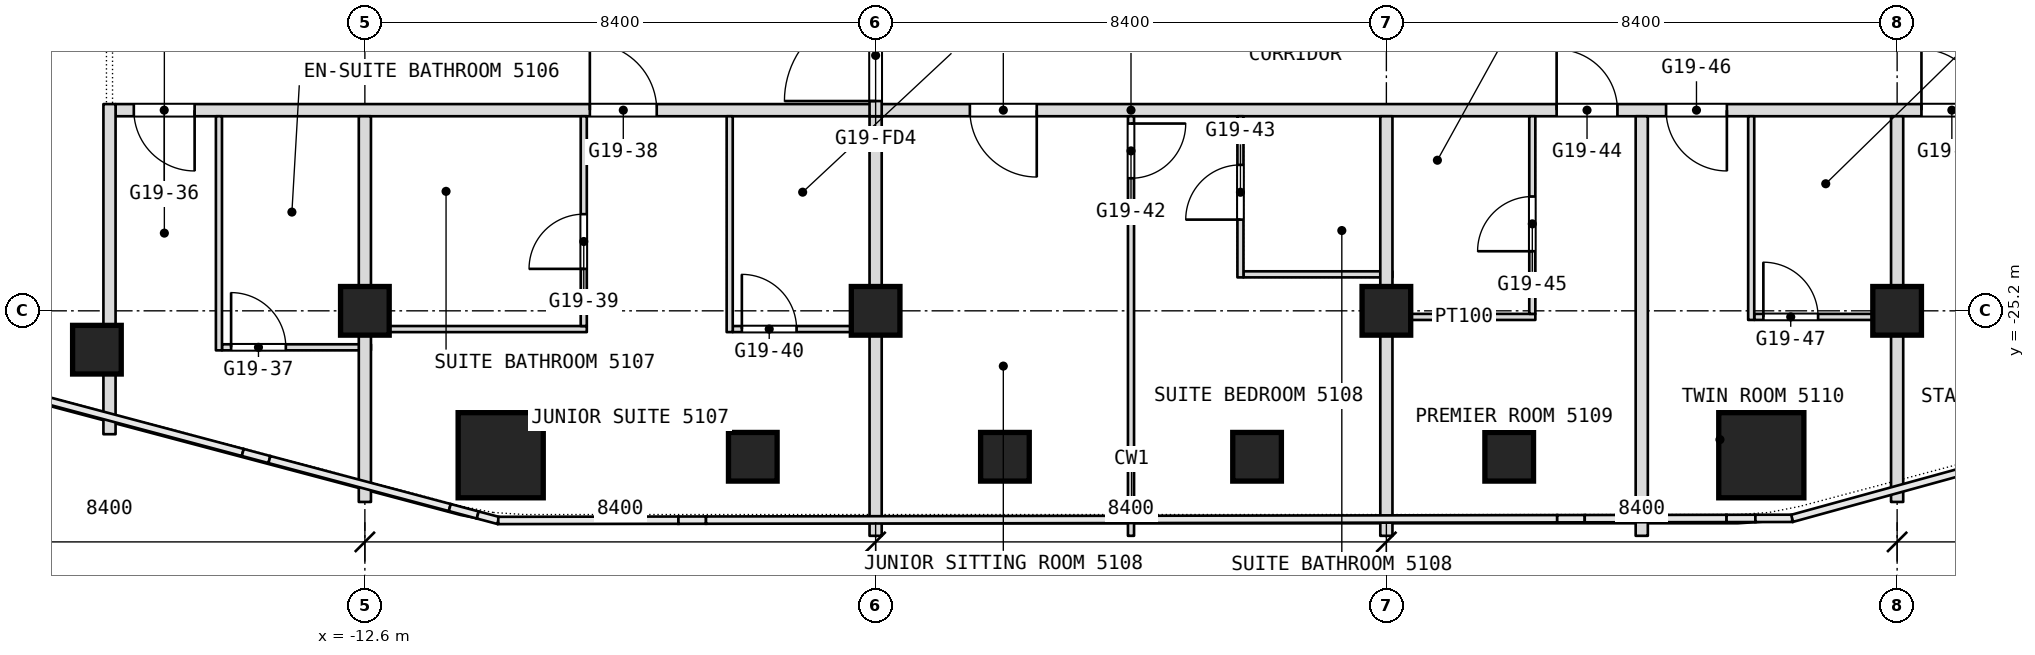
"""IFC4 building model, lengths in metres.
Left out: names, types, materials, properties, quantities, classifications, styles, units other than length and angle.
Written with IfcOpenShell. Run it as: python <this file> out.ifc"""

import sys

from ifc_helpers import new_model, si_unit, direction, frame, frame_2d, origin, origin_2d, place, context, subcontext, project, spatial, rectangle, extrude, element, fill, save


model = new_model("IFC4")
c1 = context("Model", 3, precision=1e-05, world=origin(), true_north=direction((0.0, 1.0)))
c2 = subcontext(c1, "Body", "Model", "MODEL_VIEW")
j1 = project(units=[si_unit("LENGTHUNIT", "METRE"), si_unit("PLANEANGLEUNIT", "RADIAN")], contexts=[c1])
p1 = place(None, origin())
s1 = spatial("IfcSite", under=j1, at=p1, CompositionType="ELEMENT")
p2 = place(p1, origin())
s2 = spatial("IfcBuilding", under=s1, at=p2, CompositionType="ELEMENT")
p3 = place(p2, frame((0.0, 0.0, 220.1)))
s3 = spatial("IfcBuildingStorey", under=s2, at=p3, CompositionType="ELEMENT", Elevation=220.1)
for number, where, z_axis, x_axis in (
    (1, (-10.366, -27.575, 0.0), (0.0, 0.0, 1.0), (1.0, 0.0, 0.0)),
    (2, (10.366, -27.575, 0.0), (0.0, 0.0, 1.0), (1.0, 0.0, 0.0)),
):
    element("IfcColumn", number, at=place(p3, frame(where, z_axis=z_axis, x_axis=x_axis)), inside=s3, PredefinedType="COLUMN", context=c2, shape_type="SweptSolid", body=[
        extrude(rectangle(XDim=1.4, YDim=1.4, at=origin_2d()), origin(), (0.0, 0.0, 1.0), 3.6),
    ])
for number, where, z_axis, x_axis in (
    (3, (-12.6, -25.2, 0.0), (0.0, 0.0, 1.0), (1.0, 0.0, 0.0)),
    (4, (-4.2, -25.2, 0.0), (0.0, 0.0, 1.0), (1.0, 0.0, 0.0)),
    (5, (4.2, -25.2, 0.0), (0.0, 0.0, 1.0), (1.0, 0.0, 0.0)),
    (6, (12.6, -25.2, 0.0), (0.0, 0.0, 1.0), (1.0, 0.0, 0.0)),
    (7, (6.22, -27.6, 0.0), (0.0, 0.0, 1.0), (1.0, 0.0, 0.0)),
    (8, (2.073, -27.6, 0.0), (0.0, 0.0, 1.0), (1.0, 0.0, 0.0)),
    (9, (-2.073, -27.6, 0.0), (0.0, 0.0, 1.0), (1.0, 0.0, 0.0)),
    (10, (-6.22, -27.6, 0.0), (0.0, 0.0, 1.0), (1.0, 0.0, 0.0)),
    (11, (-17.007, -25.839, 0.0), (0.0, 0.0, 1.0), (1.0, 0.0, 0.0)),
):
    element("IfcColumn", number, at=place(p3, frame(where, z_axis=z_axis, x_axis=x_axis)), inside=s3, PredefinedType="COLUMN", context=c2, shape_type="SweptSolid", body=[
        extrude(rectangle(XDim=0.8, YDim=0.8, at=origin_2d()), origin(), (0.0, 0.0, 1.0), 3.6),
    ])
p4 = place(p3, frame((-14.95, -25.8, 0.0), z_axis=(0.0, 0.0, 1.0), x_axis=(1.0, 0.0, 0.0)))
e12 = element("IfcWall", 12, at=p4, inside=s3, PredefinedType="PARTITIONING", context=c2, shape_type="SweptSolid", body=[
    extrude(rectangle(XDim=2.45, YDim=0.1, at=frame_2d((1.225, 0.0))), origin(), (0.0, 0.0, 1.0), 3.34),
])
p5 = place(p4, frame((0.15, 0.0, 0.0)))
e13 = element("IfcOpeningElement", 13, at=p5, cuts=e12, PredefinedType="OPENING", context=c2, shape_type="SweptSolid", body=[
    extrude(rectangle(XDim=0.9, YDim=2.1, at=frame_2d((0.45, 1.05))), frame((0.0, 0.05, 0.0), z_axis=(0.0, -1.0, 0.0), x_axis=(1.0, 0.0, 0.0)), (0.0, 0.0, 1.0), 0.1),
])
p6 = place(p3, frame((-12.5, -25.5, 0.0), z_axis=(0.0, 0.0, 1.0), x_axis=(1.0, 0.0, 0.0)))
e14 = element("IfcWall", 14, at=p6, inside=s3, PredefinedType="PARTITIONING", context=c2, shape_type="SweptSolid", body=[
    extrude(rectangle(XDim=3.55, YDim=0.1, at=frame_2d((1.775, 0.0))), origin(), (0.0, 0.0, 1.0), 3.34),
])
p7 = place(p3, frame((-6.55, -25.5, 0.0), z_axis=(0.0, 0.0, 1.0), x_axis=(1.0, 0.0, 0.0)))
e15 = element("IfcWall", 15, at=p7, inside=s3, PredefinedType="PARTITIONING", context=c2, shape_type="SweptSolid", body=[
    extrude(rectangle(XDim=2.45, YDim=0.1, at=frame_2d((1.225, 0.0))), origin(), (0.0, 0.0, 1.0), 3.34),
])
p8 = place(p7, frame((0.15, 0.0, 0.0)))
e16 = element("IfcOpeningElement", 16, at=p8, cuts=e15, PredefinedType="OPENING", context=c2, shape_type="SweptSolid", body=[
    extrude(rectangle(XDim=0.9, YDim=2.1, at=frame_2d((0.45, 1.05))), frame((0.0, 0.05, 0.0), z_axis=(0.0, -1.0, 0.0), x_axis=(1.0, 0.0, 0.0)), (0.0, 0.0, 1.0), 0.1),
])
p9 = place(p3, frame((4.3, -25.3, 0.0), z_axis=(0.0, 0.0, 1.0), x_axis=(1.0, 0.0, 0.0)))
e17 = element("IfcWall", 17, at=p9, inside=s3, PredefinedType="PARTITIONING", context=c2, shape_type="SweptSolid", body=[
    extrude(rectangle(XDim=2.35, YDim=0.1, at=frame_2d((1.175, 0.0))), origin(), (0.0, 0.0, 1.0), 2.94),
])
p10 = place(p3, frame((10.25, -25.3, 0.0), z_axis=(0.0, 0.0, 1.0), x_axis=(1.0, 0.0, 0.0)))
e18 = element("IfcWall", 18, at=p10, inside=s3, PredefinedType="PARTITIONING", context=c2, shape_type="SweptSolid", body=[
    extrude(rectangle(XDim=2.45, YDim=0.1, at=frame_2d((1.225, 0.0))), origin(), (0.0, 0.0, 1.0), 2.94),
])
p11 = place(p10, frame((0.15, 0.0, 0.0)))
e19 = element("IfcOpeningElement", 19, at=p11, cuts=e18, PredefinedType="OPENING", context=c2, shape_type="SweptSolid", body=[
    extrude(rectangle(XDim=0.9, YDim=2.1, at=frame_2d((0.45, 1.05))), frame((0.0, 0.05, 0.0), z_axis=(0.0, -1.0, 0.0), x_axis=(1.0, 0.0, 0.0)), (0.0, 0.0, 1.0), 0.1),
])
p12 = place(p3, frame((1.85, -24.6, 0.0), z_axis=(0.0, 0.0, 1.0), x_axis=(1.0, 0.0, 0.0)))
e20 = element("IfcWall", 20, at=p12, inside=s3, PredefinedType="PARTITIONING", context=c2, shape_type="SweptSolid", body=[
    extrude(rectangle(XDim=2.45, YDim=0.1, at=frame_2d((1.225, 0.0))), origin(), (0.0, 0.0, 1.0), 3.34),
])
p13 = place(p3, frame((-16.7, -21.9, 0.0), z_axis=(0.0, 0.0, 1.0), x_axis=(1.0, 0.0, 0.0)))
e21 = element("IfcWall", 21, at=p13, inside=s3, PredefinedType="PARTITIONING", context=c2, shape_type="SweptSolid", body=[
    extrude(rectangle(XDim=33.4, YDim=0.2, at=frame_2d((16.7, 0.0))), origin(), (0.0, 0.0, 1.0), 3.34),
])
p14 = place(p13, frame((0.3, 0.0, 0.0)))
e22 = element("IfcOpeningElement", 22, at=p14, cuts=e21, PredefinedType="OPENING", context=c2, shape_type="SweptSolid", body=[
    extrude(rectangle(XDim=1.0, YDim=2.1, at=frame_2d((0.5, 1.05))), frame((0.0, 0.1, 0.0), z_axis=(0.0, -1.0, 0.0), x_axis=(1.0, 0.0, 0.0)), (0.0, 0.0, 1.0), 0.2),
])
p15 = place(p13, frame((7.8, 0.0, 0.0)))
e23 = element("IfcOpeningElement", 23, at=p15, cuts=e21, PredefinedType="OPENING", context=c2, shape_type="SweptSolid", body=[
    extrude(rectangle(XDim=1.1, YDim=2.1, at=frame_2d((0.55, 1.05))), frame((0.0, 0.1, 0.0), z_axis=(0.0, -1.0, 0.0), x_axis=(1.0, 0.0, 0.0)), (0.0, 0.0, 1.0), 0.2),
])
p16 = place(p13, frame((14.05, 0.0, 0.0)))
e24 = element("IfcOpeningElement", 24, at=p16, cuts=e21, PredefinedType="OPENING", context=c2, shape_type="SweptSolid", body=[
    extrude(rectangle(XDim=1.1, YDim=2.1, at=frame_2d((0.55, 1.05))), frame((0.0, 0.1, 0.0), z_axis=(0.0, -1.0, 0.0), x_axis=(1.0, 0.0, 0.0)), (0.0, 0.0, 1.0), 0.2),
])
p17 = place(p13, frame((23.7, 0.0, 0.0)))
e25 = element("IfcOpeningElement", 25, at=p17, cuts=e21, PredefinedType="OPENING", context=c2, shape_type="SweptSolid", body=[
    extrude(rectangle(XDim=1.0, YDim=2.1, at=frame_2d((0.5, 1.05))), frame((0.0, 0.1, 0.0), z_axis=(0.0, -1.0, 0.0), x_axis=(1.0, 0.0, 0.0)), (0.0, 0.0, 1.0), 0.2),
])
p18 = place(p13, frame((25.5, 0.0, 0.0)))
e26 = element("IfcOpeningElement", 26, at=p18, cuts=e21, PredefinedType="OPENING", context=c2, shape_type="SweptSolid", body=[
    extrude(rectangle(XDim=1.0, YDim=2.1, at=frame_2d((0.5, 1.05))), frame((0.0, 0.1, 0.0), z_axis=(0.0, -1.0, 0.0), x_axis=(1.0, 0.0, 0.0)), (0.0, 0.0, 1.0), 0.2),
])
p19 = place(p13, frame((29.7, 0.0, 0.0)))
e27 = element("IfcOpeningElement", 27, at=p19, cuts=e21, PredefinedType="OPENING", context=c2, shape_type="SweptSolid", body=[
    extrude(rectangle(XDim=1.0, YDim=2.1, at=frame_2d((0.5, 1.05))), frame((0.0, 0.1, 0.0), z_axis=(0.0, -1.0, 0.0), x_axis=(1.0, 0.0, 0.0)), (0.0, 0.0, 1.0), 0.2),
])
p20 = place(p3, frame((12.6, -28.343, 0.0), z_axis=(0.0, 0.0, 1.0), x_axis=(0.0, 1.0, 0.0)))
e28 = element("IfcWall", 28, at=p20, inside=s3, PredefinedType="PARTITIONING", context=c2, shape_type="SweptSolid", body=[
    extrude(rectangle(XDim=6.343, YDim=0.2, at=frame_2d((3.171, 0.0))), origin(), (0.0, 0.0, 1.0), 3.34),
])
p21 = place(p3, frame((10.2, -25.35, 0.0), z_axis=(0.0, 0.0, 1.0), x_axis=(0.0, 1.0, 0.0)))
e29 = element("IfcWall", 29, at=p21, inside=s3, PredefinedType="PARTITIONING", context=c2, shape_type="SweptSolid", body=[
    extrude(rectangle(XDim=3.35, YDim=0.1, at=frame_2d((1.675, 0.0))), origin(), (0.0, 0.0, 1.0), 3.34),
])
p22 = place(p3, frame((8.4, -28.9, 0.0), z_axis=(0.0, 0.0, 1.0), x_axis=(0.0, 1.0, 0.0)))
e30 = element("IfcWall", 30, at=p22, inside=s3, PredefinedType="PARTITIONING", context=c2, shape_type="SweptSolid", body=[
    extrude(rectangle(XDim=6.9, YDim=0.2, at=frame_2d((3.45, 0.0))), origin(), (0.0, 0.0, 1.0), 3.34),
])
p23 = place(p3, frame((6.6, -25.25, 0.0), z_axis=(0.0, 0.0, 1.0), x_axis=(0.0, 1.0, 0.0)))
e31 = element("IfcWall", 31, at=p23, inside=s3, PredefinedType="PARTITIONING", context=c2, shape_type="SweptSolid", body=[
    extrude(rectangle(XDim=3.25, YDim=0.1, at=frame_2d((1.625, 0.0))), origin(), (0.0, 0.0, 1.0), 3.34),
])
p24 = place(p23, frame((1.03, 0.0, 0.0)))
e32 = element("IfcOpeningElement", 32, at=p24, cuts=e31, PredefinedType="OPENING", context=c2, shape_type="SweptSolid", body=[
    extrude(rectangle(XDim=0.9, YDim=2.1, at=frame_2d((0.45, 1.05))), frame((0.0, 0.05, 0.0), z_axis=(0.0, -1.0, 0.0), x_axis=(1.0, 0.0, 0.0)), (0.0, 0.0, 1.0), 0.1),
])
p25 = place(p3, frame((4.2, -28.9, 0.0), z_axis=(0.0, 0.0, 1.0), x_axis=(0.0, 1.0, 0.0)))
e33 = element("IfcWall", 33, at=p25, inside=s3, PredefinedType="PARTITIONING", context=c2, shape_type="SweptSolid", body=[
    extrude(rectangle(XDim=6.9, YDim=0.2, at=frame_2d((3.45, 0.0))), origin(), (0.0, 0.0, 1.0), 3.34),
])
p26 = place(p3, frame((1.8, -24.65, 0.0), z_axis=(0.0, 0.0, 1.0), x_axis=(0.0, 1.0, 0.0)))
e34 = element("IfcWall", 34, at=p26, inside=s3, PredefinedType="PARTITIONING", context=c2, shape_type="SweptSolid", body=[
    extrude(rectangle(XDim=2.65, YDim=0.1, at=frame_2d((1.325, 0.0))), origin(), (0.0, 0.0, 1.0), 3.34),
])
p27 = place(p26, frame((0.95, 0.0, 0.0)))
e35 = element("IfcOpeningElement", 35, at=p27, cuts=e34, PredefinedType="OPENING", context=c2, shape_type="SweptSolid", body=[
    extrude(rectangle(XDim=0.9, YDim=2.1, at=frame_2d((0.45, 1.05))), frame((0.0, 0.05, 0.0), z_axis=(0.0, -1.0, 0.0), x_axis=(1.0, 0.0, 0.0)), (0.0, 0.0, 1.0), 0.1),
])
p28 = place(p3, frame((0.0, -28.9, 0.0), z_axis=(0.0, 0.0, 1.0), x_axis=(0.0, 1.0, 0.0)))
e36 = element("IfcWall", 36, at=p28, inside=s3, PredefinedType="PARTITIONING", context=c2, shape_type="SweptSolid", body=[
    extrude(rectangle(XDim=6.9, YDim=0.1, at=frame_2d((3.45, 0.0))), origin(), (0.0, 0.0, 1.0), 3.34),
])
p29 = place(p28, frame((5.88, 0.0, 0.0)))
e37 = element("IfcOpeningElement", 37, at=p29, cuts=e36, PredefinedType="OPENING", context=c2, shape_type="SweptSolid", body=[
    extrude(rectangle(XDim=0.9, YDim=2.1, at=frame_2d((0.45, 1.05))), frame((0.0, 0.05, 0.0), z_axis=(0.0, -1.0, 0.0), x_axis=(1.0, 0.0, 0.0)), (0.0, 0.0, 1.0), 0.1),
])
p30 = place(p3, frame((-4.2, -28.9, 0.0), z_axis=(0.0, 0.0, 1.0), x_axis=(0.0, 1.0, 0.0)))
e38 = element("IfcWall", 38, at=p30, inside=s3, PredefinedType="PARTITIONING", context=c2, shape_type="SweptSolid", body=[
    extrude(rectangle(XDim=6.9, YDim=0.2, at=frame_2d((3.45, 0.0))), origin(), (0.0, 0.0, 1.0), 3.34),
])
p31 = place(p3, frame((-4.2, -22.0, 0.0), z_axis=(0.0, 0.0, 1.0), x_axis=(0.0, 1.0, 0.0)))
e39 = element("IfcWall", 39, at=p31, inside=s3, PredefinedType="PARTITIONING", context=c2, shape_type="SweptSolid", body=[
    extrude(rectangle(XDim=8.4, YDim=0.2, at=frame_2d((4.2, 0.0))), origin(), (0.0, 0.0, 1.0), 3.34),
])
p32 = place(p31, frame((0.25, 0.0, 0.0)))
e40 = element("IfcOpeningElement", 40, at=p32, cuts=e39, PredefinedType="OPENING", context=c2, shape_type="SweptSolid", body=[
    extrude(rectangle(XDim=1.5, YDim=2.1, at=frame_2d((0.75, 1.05))), frame((0.0, 0.1, 0.0), z_axis=(0.0, -1.0, 0.0), x_axis=(1.0, 0.0, 0.0)), (0.0, 0.0, 1.0), 0.2),
])
p33 = place(p3, frame((-6.6, -25.55, 0.0), z_axis=(0.0, 0.0, 1.0), x_axis=(0.0, 1.0, 0.0)))
e41 = element("IfcWall", 41, at=p33, inside=s3, PredefinedType="PARTITIONING", context=c2, shape_type="SweptSolid", body=[
    extrude(rectangle(XDim=3.55, YDim=0.1, at=frame_2d((1.775, 0.0))), origin(), (0.0, 0.0, 1.0), 3.34),
])
p34 = place(p3, frame((-9.0, -25.45, 0.0), z_axis=(0.0, 0.0, 1.0), x_axis=(0.0, 1.0, 0.0)))
e42 = element("IfcWall", 42, at=p34, inside=s3, PredefinedType="PARTITIONING", context=c2, shape_type="SweptSolid", body=[
    extrude(rectangle(XDim=3.45, YDim=0.1, at=frame_2d((1.725, 0.0))), origin(), (0.0, 0.0, 1.0), 3.34),
])
p35 = place(p34, frame((0.94, 0.0, 0.0)))
e43 = element("IfcOpeningElement", 43, at=p35, cuts=e42, PredefinedType="OPENING", context=c2, shape_type="SweptSolid", body=[
    extrude(rectangle(XDim=0.9, YDim=2.1, at=frame_2d((0.45, 1.05))), frame((0.0, 0.05, 0.0), z_axis=(0.0, -1.0, 0.0), x_axis=(1.0, 0.0, 0.0)), (0.0, 0.0, 1.0), 0.1),
])
p36 = place(p3, frame((-12.6, -28.343, 0.0), z_axis=(0.0, 0.0, 1.0), x_axis=(0.0, 1.0, 0.0)))
e44 = element("IfcWall", 44, at=p36, inside=s3, PredefinedType="PARTITIONING", context=c2, shape_type="SweptSolid", body=[
    extrude(rectangle(XDim=6.343, YDim=0.2, at=frame_2d((3.171, 0.0))), origin(), (0.0, 0.0, 1.0), 3.34),
])
p37 = place(p3, frame((-15.0, -25.85, 0.0), z_axis=(0.0, 0.0, 1.0), x_axis=(0.0, 1.0, 0.0)))
e45 = element("IfcWall", 45, at=p37, inside=s3, PredefinedType="PARTITIONING", context=c2, shape_type="SweptSolid", body=[
    extrude(rectangle(XDim=3.85, YDim=0.1, at=frame_2d((1.925, 0.0))), origin(), (0.0, 0.0, 1.0), 3.34),
])
p38 = place(p3, frame((-16.8, -27.229, 0.0), z_axis=(0.0, 0.0, 1.0), x_axis=(0.0, 1.0, 0.0)))
e46 = element("IfcWall", 46, at=p38, inside=s3, PredefinedType="PARTITIONING", context=c2, shape_type="SweptSolid", body=[
    extrude(rectangle(XDim=5.429, YDim=0.2, at=frame_2d((2.714, 0.0))), origin(), (0.0, 0.0, 1.0), 3.34),
])
p39 = place(p5, origin())
e47 = element("IfcDoor", 47, at=p39, inside=s3, OperationType="SINGLE_SWING_LEFT", PredefinedType="DOOR", context=c2, shape_type="SweptSolid", body=[
    extrude(rectangle(XDim=0.9, YDim=2.1, at=frame_2d((0.45, 1.05))), frame((0.0, 0.025, 0.0), z_axis=(0.0, -1.0, 0.0), x_axis=(1.0, 0.0, 0.0)), (0.0, 0.0, 1.0), 0.05),
])
fill(e13, e47)
p40 = place(p8, origin())
e48 = element("IfcDoor", 48, at=p40, inside=s3, OperationType="SINGLE_SWING_LEFT", PredefinedType="DOOR", context=c2, shape_type="SweptSolid", body=[
    extrude(rectangle(XDim=0.9, YDim=2.1, at=frame_2d((0.45, 1.05))), frame((0.0, 0.025, 0.0), z_axis=(0.0, -1.0, 0.0), x_axis=(1.0, 0.0, 0.0)), (0.0, 0.0, 1.0), 0.05),
])
fill(e16, e48)
p41 = place(p11, origin())
e49 = element("IfcDoor", 49, at=p41, inside=s3, OperationType="SINGLE_SWING_LEFT", PredefinedType="DOOR", context=c2, shape_type="SweptSolid", body=[
    extrude(rectangle(XDim=0.9, YDim=2.1, at=frame_2d((0.45, 1.05))), frame((0.0, 0.025, 0.0), z_axis=(0.0, -1.0, 0.0), x_axis=(1.0, 0.0, 0.0)), (0.0, 0.0, 1.0), 0.05),
])
fill(e19, e49)
p42 = place(p14, origin())
e50 = element("IfcDoor", 50, at=p42, inside=s3, OperationType="SINGLE_SWING_RIGHT", PredefinedType="DOOR", context=c2, shape_type="SweptSolid", body=[
    extrude(rectangle(XDim=1.0, YDim=2.1, at=frame_2d((0.5, 1.05))), frame((0.0, 0.025, 0.0), z_axis=(0.0, -1.0, 0.0), x_axis=(1.0, 0.0, 0.0)), (0.0, 0.0, 1.0), 0.05),
])
fill(e22, e50)
p43 = place(p15, origin())
e51 = element("IfcDoor", 51, at=p43, inside=s3, OperationType="SINGLE_SWING_RIGHT", PredefinedType="DOOR", context=c2, shape_type="SweptSolid", body=[
    extrude(rectangle(XDim=1.1, YDim=2.1, at=frame_2d((0.55, 1.05))), frame((0.0, 0.025, 0.0), z_axis=(0.0, -1.0, 0.0), x_axis=(1.0, 0.0, 0.0)), (0.0, 0.0, 1.0), 0.05),
])
fill(e23, e51)
p44 = place(p16, origin())
e52 = element("IfcDoor", 52, at=p44, inside=s3, OperationType="SINGLE_SWING_LEFT", PredefinedType="DOOR", context=c2, shape_type="SweptSolid", body=[
    extrude(rectangle(XDim=1.1, YDim=2.1, at=frame_2d((0.55, 1.05))), frame((0.0, 0.025, 0.0), z_axis=(0.0, -1.0, 0.0), x_axis=(1.0, 0.0, 0.0)), (0.0, 0.0, 1.0), 0.05),
])
fill(e24, e52)
p45 = place(p17, origin())
e53 = element("IfcDoor", 53, at=p45, inside=s3, OperationType="SINGLE_SWING_RIGHT", PredefinedType="DOOR", context=c2, shape_type="SweptSolid", body=[
    extrude(rectangle(XDim=1.0, YDim=2.1, at=frame_2d((0.5, 1.05))), frame((0.0, 0.025, 0.0), z_axis=(0.0, -1.0, 0.0), x_axis=(1.0, 0.0, 0.0)), (0.0, 0.0, 1.0), 0.05),
])
fill(e25, e53)
p46 = place(p18, origin())
e54 = element("IfcDoor", 54, at=p46, inside=s3, OperationType="SINGLE_SWING_RIGHT", PredefinedType="DOOR", context=c2, shape_type="SweptSolid", body=[
    extrude(rectangle(XDim=1.0, YDim=2.1, at=frame_2d((0.5, 1.05))), frame((0.0, 0.025, 0.0), z_axis=(0.0, -1.0, 0.0), x_axis=(1.0, 0.0, 0.0)), (0.0, 0.0, 1.0), 0.05),
])
fill(e26, e54)
p47 = place(p19, origin())
e55 = element("IfcDoor", 55, at=p47, inside=s3, OperationType="SINGLE_SWING_RIGHT", PredefinedType="DOOR", context=c2, shape_type="SweptSolid", body=[
    extrude(rectangle(XDim=1.0, YDim=2.1, at=frame_2d((0.5, 1.05))), frame((0.0, 0.025, 0.0), z_axis=(0.0, -1.0, 0.0), x_axis=(1.0, 0.0, 0.0)), (0.0, 0.0, 1.0), 0.05),
])
fill(e27, e55)
p48 = place(p24, origin())
e56 = element("IfcDoor", 56, at=p48, inside=s3, OperationType="SINGLE_SWING_LEFT", PredefinedType="DOOR", context=c2, shape_type="SweptSolid", body=[
    extrude(rectangle(XDim=0.9, YDim=2.1, at=frame_2d((0.45, 1.05))), frame((0.0, 0.025, 0.0), z_axis=(0.0, -1.0, 0.0), x_axis=(1.0, 0.0, 0.0)), (0.0, 0.0, 1.0), 0.05),
])
fill(e32, e56)
p49 = place(p27, origin())
e57 = element("IfcDoor", 57, at=p49, inside=s3, OperationType="SINGLE_SWING_LEFT", PredefinedType="DOOR", context=c2, shape_type="SweptSolid", body=[
    extrude(rectangle(XDim=0.9, YDim=2.1, at=frame_2d((0.45, 1.05))), frame((0.0, 0.025, 0.0), z_axis=(0.0, -1.0, 0.0), x_axis=(1.0, 0.0, 0.0)), (0.0, 0.0, 1.0), 0.05),
])
fill(e35, e57)
p50 = place(p29, origin())
e58 = element("IfcDoor", 58, at=p50, inside=s3, OperationType="SINGLE_SWING_LEFT", PredefinedType="DOOR", context=c2, shape_type="SweptSolid", body=[
    extrude(rectangle(XDim=0.9, YDim=2.1, at=frame_2d((0.45, 1.05))), frame((0.0, 0.025, 0.0), z_axis=(0.0, -1.0, 0.0), x_axis=(1.0, 0.0, 0.0)), (0.0, 0.0, 1.0), 0.05),
])
fill(e37, e58)
p51 = place(p35, origin())
e59 = element("IfcDoor", 59, at=p51, inside=s3, OperationType="SINGLE_SWING_LEFT", PredefinedType="DOOR", context=c2, shape_type="SweptSolid", body=[
    extrude(rectangle(XDim=0.9, YDim=2.1, at=frame_2d((0.45, 1.05))), frame((0.0, 0.025, 0.0), z_axis=(0.0, -1.0, 0.0), x_axis=(1.0, 0.0, 0.0)), (0.0, 0.0, 1.0), 0.05),
])
fill(e43, e59)
p52 = place(p32, origin())
e60 = element("IfcDoor", 60, at=p52, inside=s3, OperationType="DOUBLE_DOOR_DOUBLE_SWING", PredefinedType="DOOR", context=c2, shape_type="SweptSolid", body=[
    extrude(rectangle(XDim=1.5, YDim=2.1, at=frame_2d((0.75, 1.05))), frame((0.0, 0.025, 0.0), z_axis=(0.0, -1.0, 0.0), x_axis=(1.0, 0.0, 0.0)), (0.0, 0.0, 1.0), 0.05),
])
fill(e40, e60)
save(model, sys.argv[1])
